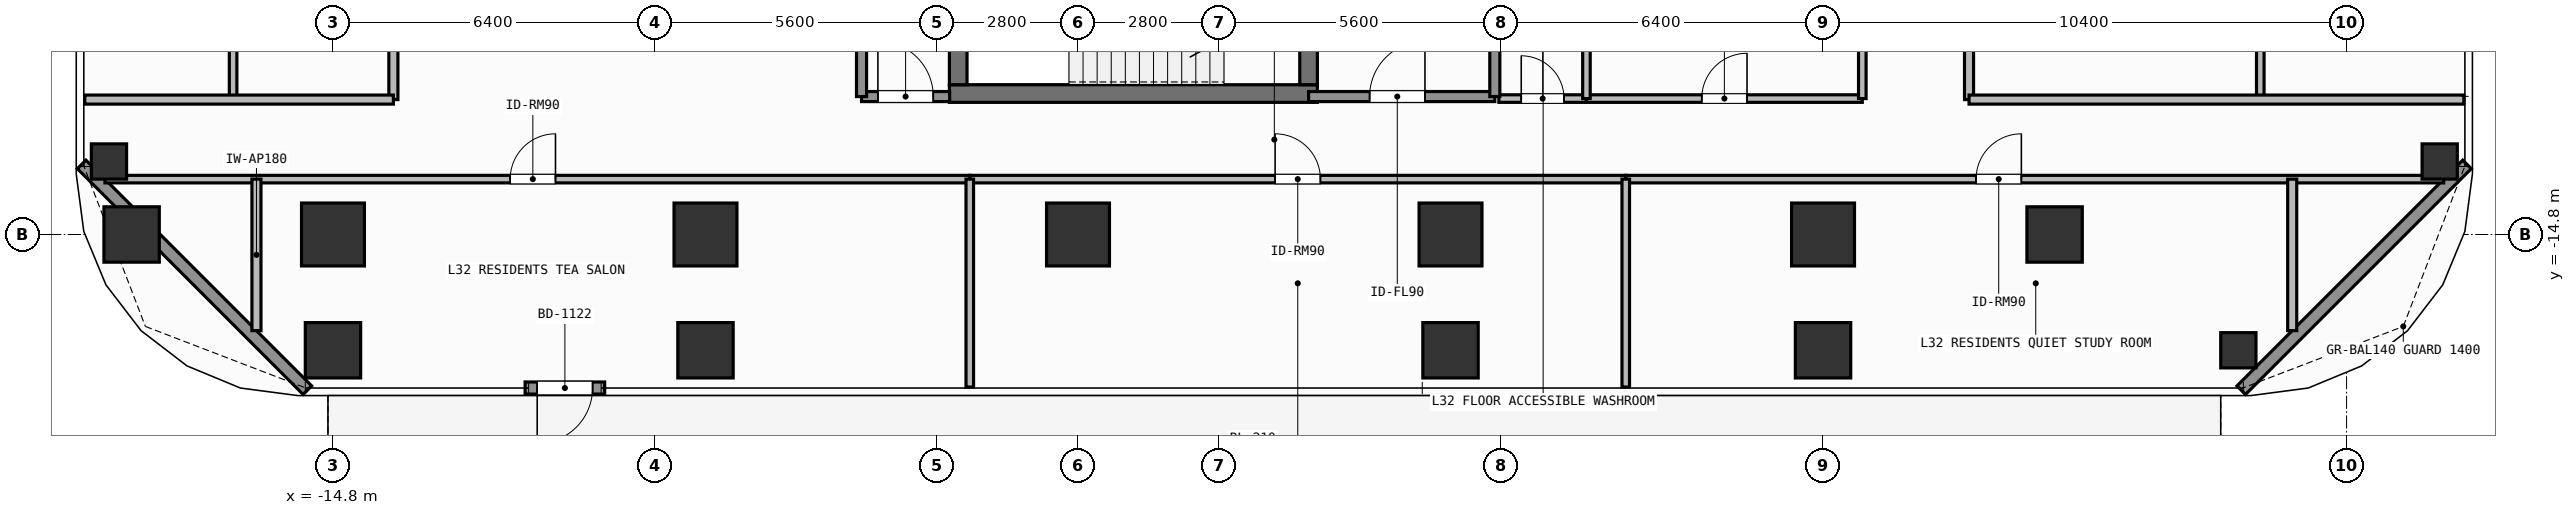
"""IFC4 building model, lengths in metres.
Left out: names, types, materials, properties, quantities, classifications, styles, units other than length and angle.
Written with IfcOpenShell. Run it as: python <this file> out.ifc"""

import sys

from ifc_helpers import new_model, si_unit, direction, frame, frame_2d, origin, origin_2d, place, context, subcontext, project, spatial, rectangle, hollow_rectangle, extrude, element, fill, save


model = new_model("IFC4")
c1 = context("Model", 3, precision=1e-05, world=origin(), true_north=direction((0.0, 1.0)))
c2 = subcontext(c1, "Body", "Model", "MODEL_VIEW")
j1 = project(units=[si_unit("LENGTHUNIT", "METRE"), si_unit("PLANEANGLEUNIT", "RADIAN")], contexts=[c1])
p1 = place(None, origin())
s1 = spatial("IfcSite", under=j1, at=p1, CompositionType="ELEMENT")
p2 = place(p1, origin())
s2 = spatial("IfcBuilding", under=s1, at=p2, CompositionType="ELEMENT")
p3 = place(p2, frame((0.0, 0.0, 129.0)))
s3 = spatial("IfcBuildingStorey", under=s2, at=p3, CompositionType="ELEMENT", Elevation=129.0)
p4 = place(p3, frame((-2.555, -12.0, 0.0), z_axis=(0.0, 0.0, 1.0), x_axis=(1.0, 0.0, 0.0)))
e1 = element("IfcWall", 1, at=p4, inside=s3, PredefinedType="SHEAR", context=c2, shape_type="SweptSolid", body=[
    extrude(rectangle(XDim=7.31, YDim=0.35, at=frame_2d((3.655, 0.0))), origin(), (0.0, 0.0, 1.0), 3.9),
])
p5 = place(p3, frame((-2.38, -11.825, 0.0), z_axis=(0.0, 0.0, 1.0), x_axis=(0.0, 1.0, 0.0)))
e2 = element("IfcWall", 2, at=p5, inside=s3, PredefinedType="SHEAR", context=c2, shape_type="SweptSolid", body=[
    extrude(rectangle(XDim=2.925, YDim=0.35, at=frame_2d((1.462, 0.0))), origin(), (0.0, 0.0, 1.0), 3.9),
])
p6 = place(p3, frame((4.58, -8.9, 0.0), z_axis=(0.0, 0.0, 1.0), x_axis=(0.0, -1.0, 0.0)))
e3 = element("IfcWall", 3, at=p6, inside=s3, PredefinedType="SHEAR", context=c2, shape_type="SweptSolid", body=[
    extrude(rectangle(XDim=2.925, YDim=0.35, at=frame_2d((1.462, 0.0))), origin(), (0.0, 0.0, 1.0), 3.9),
])
p7 = place(p6, frame((0.913, 0.0, 0.0)))
e4 = element("IfcOpeningElement", 4, at=p7, cuts=e3, PredefinedType="OPENING", context=c2, shape_type="SweptSolid", body=[
    extrude(rectangle(XDim=1.1, YDim=2.15, at=frame_2d((0.55, 1.075))), frame((0.0, 0.185, 0.0), z_axis=(0.0, -1.0, 0.0), x_axis=(1.0, 0.0, 0.0)), (0.0, 0.0, 1.0), 0.37),
])
for number, where, z_axis, x_axis in (
    (5, (-14.8, -14.8, 0.0), (0.0, 0.0, 1.0), (1.0, 0.0, 0.0)),
    (6, (-7.4, -14.8, 0.0), (0.0, 0.0, 1.0), (1.0, 0.0, 0.0)),
    (7, (0.0, -14.8, 0.0), (0.0, 0.0, 1.0), (1.0, 0.0, 0.0)),
    (8, (7.4, -14.8, 0.0), (0.0, 0.0, 1.0), (1.0, 0.0, 0.0)),
    (9, (14.8, -14.8, 0.0), (0.0, 0.0, 1.0), (1.0, 0.0, 0.0)),
):
    element("IfcColumn", number, at=place(p3, frame(where, z_axis=z_axis, x_axis=x_axis)), inside=s3, PredefinedType="COLUMN", context=c2, shape_type="SweptSolid", body=[
        extrude(rectangle(XDim=1.25, YDim=1.25, at=origin_2d()), origin(), (0.0, 0.0, 1.0), 3.9),
    ])
for number, where, z_axis, x_axis in (
    (10, (-18.8, -14.8, 0.0), (0.0, 0.0, 1.0), (1.0, 0.0, 0.0)),
    (11, (19.4, -14.8, 0.0), (0.0, 0.0, 1.0), (1.0, 0.0, 0.0)),
    (12, (-14.8, -17.1, 0.0), (0.0, 0.0, 1.0), (1.0, 0.0, 0.0)),
    (13, (-7.4, -17.1, 0.0), (0.0, 0.0, 1.0), (1.0, 0.0, 0.0)),
    (14, (7.4, -17.1, 0.0), (0.0, 0.0, 1.0), (1.0, 0.0, 0.0)),
    (15, (14.8, -17.1, 0.0), (0.0, 0.0, 1.0), (1.0, 0.0, 0.0)),
):
    element("IfcColumn", number, at=place(p3, frame(where, z_axis=z_axis, x_axis=x_axis)), inside=s3, PredefinedType="COLUMN", context=c2, shape_type="SweptSolid", body=[
        extrude(rectangle(XDim=1.1, YDim=1.1, at=origin_2d()), origin(), (0.0, 0.0, 1.0), 3.9),
    ])
for number, where, z_axis, x_axis in (
    (16, (23.05, -17.1, 0.0), (0.0, 0.0, 1.0), (1.0, 0.0, 0.0)),
    (17, (-19.25, -13.35, 0.0), (0.0, 0.0, 1.0), (1.0, 0.0, 0.0)),
    (18, (27.05, -13.35, 0.0), (0.0, 0.0, 1.0), (1.0, 0.0, 0.0)),
):
    element("IfcColumn", number, at=place(p3, frame(where, z_axis=z_axis, x_axis=x_axis)), inside=s3, PredefinedType="COLUMN", context=c2, shape_type="SweptSolid", body=[
        extrude(hollow_rectangle(XDim=0.7, YDim=0.7, WallThickness=0.032, at=origin_2d()), origin(), (0.0, 0.0, 1.0), 3.9),
    ])
p8 = place(p3, frame((-9.403, -17.85, 0.0), z_axis=(0.0, 0.0, 1.0), x_axis=(-1.0, 0.0, 0.0)))
e19 = element("IfcWall", 19, at=p8, inside=s3, PredefinedType="SOLIDWALL", context=c2, shape_type="SweptSolid", body=[
    extrude(rectangle(XDim=1.58, YDim=0.24, at=frame_2d((0.79, 0.0))), origin(), (0.0, 0.0, 1.0), 3.68),
])
p9 = place(p8, frame((0.24, 0.0, 0.0)))
e20 = element("IfcOpeningElement", 20, at=p9, cuts=e19, PredefinedType="OPENING", context=c2, shape_type="SweptSolid", body=[
    extrude(rectangle(XDim=1.1, YDim=2.2, at=frame_2d((0.55, 1.1))), frame((0.0, 0.13, 0.0), z_axis=(0.0, -1.0, 0.0), x_axis=(1.0, 0.0, 0.0)), (0.0, 0.0, 1.0), 0.26),
])
for number, where, z_axis, x_axis in (
    (21, (-15.308, -17.892, 0.0), (0.0, 0.0, 1.0), (-0.707, 0.707, 0.0)),
    (22, (27.592, -13.408, 0.0), (0.0, 0.0, 1.0), (-0.707, -0.707, 0.0)),
):
    element("IfcWall", number, at=place(p3, frame(where, z_axis=z_axis, x_axis=x_axis)), inside=s3, PredefinedType="SOLIDWALL", context=c2, shape_type="SweptSolid", body=[
        extrude(rectangle(XDim=6.342, YDim=0.24, at=frame_2d((3.171, 0.0))), origin(), (0.0, 0.0, 1.0), 3.68),
    ])
p10 = place(p3, frame((4.58, -12.06, 0.0), z_axis=(0.0, 0.0, 1.0), x_axis=(1.0, 0.0, 0.0)))
e23 = element("IfcWall", 23, at=p10, inside=s3, PredefinedType="SOLIDWALL", context=c2, shape_type="SweptSolid", body=[
    extrude(rectangle(XDim=3.7, YDim=0.2, at=frame_2d((1.85, 0.0))), origin(), (0.0, 0.0, 1.0), 3.68),
])
p11 = place(p10, frame((1.212, 0.0, 0.0)))
e24 = element("IfcOpeningElement", 24, at=p11, cuts=e23, PredefinedType="OPENING", context=c2, shape_type="SweptSolid", body=[
    extrude(rectangle(XDim=1.1, YDim=2.15, at=frame_2d((0.55, 1.075))), frame((0.0, 0.11, 0.0), z_axis=(0.0, -1.0, 0.0), x_axis=(1.0, 0.0, 0.0)), (0.0, 0.0, 1.0), 0.22),
])
p12 = place(p3, frame((-4.3, -12.06, 0.0), z_axis=(0.0, 0.0, 1.0), x_axis=(1.0, 0.0, 0.0)))
e25 = element("IfcWall", 25, at=p12, inside=s3, PredefinedType="SOLIDWALL", context=c2, shape_type="SweptSolid", body=[
    extrude(rectangle(XDim=1.75, YDim=0.2, at=frame_2d((0.875, 0.0))), origin(), (0.0, 0.0, 1.0), 3.68),
])
p13 = place(p12, frame((0.325, 0.0, 0.0)))
e26 = element("IfcOpeningElement", 26, at=p13, cuts=e25, PredefinedType="OPENING", context=c2, shape_type="SweptSolid", body=[
    extrude(rectangle(XDim=1.1, YDim=2.15, at=frame_2d((0.55, 1.075))), frame((0.0, 0.11, 0.0), z_axis=(0.0, -1.0, 0.0), x_axis=(1.0, 0.0, 0.0)), (0.0, 0.0, 1.0), 0.22),
])
p14 = place(p3, frame((8.36, -12.1, 0.0), z_axis=(0.0, 0.0, 1.0), x_axis=(1.0, 0.0, 0.0)))
e27 = element("IfcWall", 27, at=p14, inside=s3, PredefinedType="PARTITIONING", context=c2, shape_type="SweptSolid", body=[
    extrude(rectangle(XDim=1.74, YDim=0.15, at=frame_2d((0.87, 0.0))), origin(), (0.0, 0.0, 1.0), 3.68),
])
p15 = place(p14, frame((0.445, 0.0, 0.0)))
e28 = element("IfcOpeningElement", 28, at=p15, cuts=e27, PredefinedType="OPENING", context=c2, shape_type="SweptSolid", body=[
    extrude(rectangle(XDim=0.85, YDim=2.1, at=frame_2d((0.425, 1.05))), frame((0.0, 0.085, 0.0), z_axis=(0.0, -1.0, 0.0), x_axis=(1.0, 0.0, 0.0)), (0.0, 0.0, 1.0), 0.17),
])
p16 = place(p3, frame((10.1, -12.1, 0.0), z_axis=(0.0, 0.0, 1.0), x_axis=(1.0, 0.0, 0.0)))
e29 = element("IfcWall", 29, at=p16, inside=s3, PredefinedType="PARTITIONING", context=c2, shape_type="SweptSolid", body=[
    extrude(rectangle(XDim=5.48, YDim=0.15, at=frame_2d((2.74, 0.0))), origin(), (0.0, 0.0, 1.0), 3.68),
])
p17 = place(p16, frame((2.29, 0.0, 0.0)))
e30 = element("IfcOpeningElement", 30, at=p17, cuts=e29, PredefinedType="OPENING", context=c2, shape_type="SweptSolid", body=[
    extrude(rectangle(XDim=0.9, YDim=2.1, at=frame_2d((0.45, 1.05))), frame((0.0, 0.085, 0.0), z_axis=(0.0, -1.0, 0.0), x_axis=(1.0, 0.0, 0.0)), (0.0, 0.0, 1.0), 0.17),
])
p18 = place(p3, frame((-19.33, -13.7, 0.0), z_axis=(0.0, 0.0, 1.0), x_axis=(1.0, 0.0, 0.0)))
e31 = element("IfcWall", 31, at=p18, inside=s3, PredefinedType="PARTITIONING", context=c2, shape_type="SweptSolid", body=[
    extrude(rectangle(XDim=17.18, YDim=0.15, at=frame_2d((8.59, 0.0))), origin(), (0.0, 0.0, 1.0), 3.68),
])
p19 = place(p18, frame((8.05, 0.0, 0.0)))
e32 = element("IfcOpeningElement", 32, at=p19, cuts=e31, PredefinedType="OPENING", context=c2, shape_type="SweptSolid", body=[
    extrude(rectangle(XDim=0.9, YDim=2.1, at=frame_2d((0.45, 1.05))), frame((0.0, 0.085, 0.0), z_axis=(0.0, -1.0, 0.0), x_axis=(1.0, 0.0, 0.0)), (0.0, 0.0, 1.0), 0.17),
])
p20 = place(p3, frame((-2.15, -13.7, 0.0), z_axis=(0.0, 0.0, 1.0), x_axis=(1.0, 0.0, 0.0)))
e33 = element("IfcWall", 33, at=p20, inside=s3, PredefinedType="PARTITIONING", context=c2, shape_type="SweptSolid", body=[
    extrude(rectangle(XDim=13.031, YDim=0.15, at=frame_2d((6.516, 0.0))), origin(), (0.0, 0.0, 1.0), 3.68),
])
p21 = place(p20, frame((6.065, 0.0, 0.0)))
e34 = element("IfcOpeningElement", 34, at=p21, cuts=e33, PredefinedType="OPENING", context=c2, shape_type="SweptSolid", body=[
    extrude(rectangle(XDim=0.9, YDim=2.1, at=frame_2d((0.45, 1.05))), frame((0.0, 0.085, 0.0), z_axis=(0.0, -1.0, 0.0), x_axis=(1.0, 0.0, 0.0)), (0.0, 0.0, 1.0), 0.17),
])
p22 = place(p3, frame((10.881, -13.7, 0.0), z_axis=(0.0, 0.0, 1.0), x_axis=(1.0, 0.0, 0.0)))
e35 = element("IfcWall", 35, at=p22, inside=s3, PredefinedType="PARTITIONING", context=c2, shape_type="SweptSolid", body=[
    extrude(rectangle(XDim=16.249, YDim=0.15, at=frame_2d((8.125, 0.0))), origin(), (0.0, 0.0, 1.0), 3.68),
])
p23 = place(p22, frame((6.959, 0.0, 0.0)))
e36 = element("IfcOpeningElement", 36, at=p23, cuts=e35, PredefinedType="OPENING", context=c2, shape_type="SweptSolid", body=[
    extrude(rectangle(XDim=0.9, YDim=2.1, at=frame_2d((0.45, 1.05))), frame((0.0, 0.085, 0.0), z_axis=(0.0, -1.0, 0.0), x_axis=(1.0, 0.0, 0.0)), (0.0, 0.0, 1.0), 0.17),
])
p24 = place(p3, frame((-13.6, -12.12, 0.0), z_axis=(0.0, 0.0, 1.0), x_axis=(0.0, 1.0, 0.0)))
e37 = element("IfcWall", 37, at=p24, inside=s3, PredefinedType="PARTITIONING", context=c2, shape_type="SweptSolid", body=[
    extrude(rectangle(XDim=24.24, YDim=0.18, at=frame_2d((12.12, 0.0))), origin(), (0.0, 0.0, 1.0), 3.68),
])
p25 = place(p24, frame((11.62, 0.0, 0.0)))
e38 = element("IfcOpeningElement", 38, at=p25, cuts=e37, PredefinedType="OPENING", context=c2, shape_type="SweptSolid", body=[
    extrude(rectangle(XDim=1.0, YDim=2.2, at=frame_2d((0.5, 1.1))), frame((0.0, 0.1, 0.0), z_axis=(0.0, -1.0, 0.0), x_axis=(1.0, 0.0, 0.0)), (0.0, 0.0, 1.0), 0.2),
])
p26 = place(p3, frame((17.7, -12.12, 0.0), z_axis=(0.0, 0.0, 1.0), x_axis=(0.0, 1.0, 0.0)))
e39 = element("IfcWall", 39, at=p26, inside=s3, PredefinedType="PARTITIONING", context=c2, shape_type="SweptSolid", body=[
    extrude(rectangle(XDim=13.429, YDim=0.18, at=frame_2d((6.715, 0.0))), origin(), (0.0, 0.0, 1.0), 3.68),
])
p27 = place(p26, frame((5.324, 0.0, 0.0)))
e40 = element("IfcOpeningElement", 40, at=p27, cuts=e39, PredefinedType="OPENING", context=c2, shape_type="SweptSolid", body=[
    extrude(rectangle(XDim=1.0, YDim=2.2, at=frame_2d((0.5, 1.1))), frame((0.0, 0.1, 0.0), z_axis=(0.0, -1.0, 0.0), x_axis=(1.0, 0.0, 0.0)), (0.0, 0.0, 1.0), 0.2),
])
for number, where, z_axis, x_axis in (
    (41, (8.28, -12.06, 0.0), (0.0, 0.0, 1.0), (0.0, 1.0, 0.0)),
    (42, (-4.3, -12.06, 0.0), (0.0, 0.0, 1.0), (0.0, 1.0, 0.0)),
):
    element("IfcWall", number, at=place(p3, frame(where, z_axis=z_axis, x_axis=x_axis)), inside=s3, PredefinedType="SOLIDWALL", context=c2, shape_type="SweptSolid", body=[
        extrude(rectangle(XDim=3.185, YDim=0.2, at=frame_2d((1.593, 0.0))), origin(), (0.0, 0.0, 1.0), 3.68),
    ])
p28 = place(p3, frame((10.1, -12.1, 0.0), z_axis=(0.0, 0.0, 1.0), x_axis=(0.0, 1.0, 0.0)))
e43 = element("IfcWall", 43, at=p28, inside=s3, PredefinedType="PARTITIONING", context=c2, shape_type="SweptSolid", body=[
    extrude(rectangle(XDim=2.35, YDim=0.15, at=frame_2d((1.175, 0.0))), origin(), (0.0, 0.0, 1.0), 3.68),
])
p29 = place(p3, frame((15.58, -12.1, 0.0), z_axis=(0.0, 0.0, 1.0), x_axis=(0.0, 1.0, 0.0)))
e44 = element("IfcWall", 44, at=p29, inside=s3, PredefinedType="PARTITIONING", context=c2, shape_type="SweptSolid", body=[
    extrude(rectangle(XDim=6.25, YDim=0.15, at=frame_2d((3.125, 0.0))), origin(), (0.0, 0.0, 1.0), 3.68),
])
for number, where, z_axis, x_axis in (
    (45, (-16.32, -16.71, 0.0), (0.0, 0.0, 1.0), (0.0, 1.0, 0.0)),
    (46, (24.12, -16.71, 0.0), (0.0, 0.0, 1.0), (0.0, 1.0, 0.0)),
):
    element("IfcWall", number, at=place(p3, frame(where, z_axis=z_axis, x_axis=x_axis)), inside=s3, PredefinedType="PARTITIONING", context=c2, shape_type="SweptSolid", body=[
        extrude(rectangle(XDim=3.01, YDim=0.18, at=frame_2d((1.505, 0.0))), origin(), (0.0, 0.0, 1.0), 3.68),
    ])
for number, where, z_axis, x_axis in (
    (47, (-2.15, -17.83, 0.0), (0.0, 0.0, 1.0), (0.0, 1.0, 0.0)),
    (48, (10.881, -17.83, 0.0), (0.0, 0.0, 1.0), (0.0, 1.0, 0.0)),
):
    element("IfcWall", number, at=place(p3, frame(where, z_axis=z_axis, x_axis=x_axis)), inside=s3, PredefinedType="PARTITIONING", context=c2, shape_type="SweptSolid", body=[
        extrude(rectangle(XDim=4.13, YDim=0.15, at=frame_2d((2.065, 0.0))), origin(), (0.0, 0.0, 1.0), 3.68),
    ])
p30 = place(p3, frame((-16.784, -12.12, 0.0), z_axis=(0.0, 0.0, 1.0), x_axis=(0.0, 1.0, 0.0)))
e49 = element("IfcWall", 49, at=p30, inside=s3, PredefinedType="PARTITIONING", context=c2, shape_type="SweptSolid", body=[
    extrude(rectangle(XDim=6.671, YDim=0.15, at=frame_2d((3.335, 0.0))), origin(), (0.0, 0.0, 1.0), 3.68),
])
p31 = place(p3, frame((-19.73, -12.12, 0.0), z_axis=(0.0, 0.0, 1.0), x_axis=(1.0, 0.0, 0.0)))
e50 = element("IfcWall", 50, at=p31, inside=s3, PredefinedType="PARTITIONING", context=c2, shape_type="SweptSolid", body=[
    extrude(rectangle(XDim=6.13, YDim=0.18, at=frame_2d((3.065, 0.0))), origin(), (0.0, 0.0, 1.0), 3.68),
])
p32 = place(p3, frame((23.486, -12.12, 0.0), z_axis=(0.0, 0.0, 1.0), x_axis=(0.0, 1.0, 0.0)))
e51 = element("IfcWall", 51, at=p32, inside=s3, PredefinedType="PARTITIONING", context=c2, shape_type="SweptSolid", body=[
    extrude(rectangle(XDim=2.8, YDim=0.15, at=frame_2d((1.4, 0.0))), origin(), (0.0, 0.0, 1.0), 3.68),
])
p33 = place(p3, frame((17.7, -12.12, 0.0), z_axis=(0.0, 0.0, 1.0), x_axis=(1.0, 0.0, 0.0)))
e52 = element("IfcWall", 52, at=p33, inside=s3, PredefinedType="PARTITIONING", context=c2, shape_type="SweptSolid", body=[
    extrude(rectangle(XDim=9.83, YDim=0.18, at=frame_2d((4.915, 0.0))), origin(), (0.0, 0.0, 1.0), 3.68),
])
p34 = place(p9, origin())
e53 = element("IfcDoor", 53, at=p34, inside=s3, OperationType="SINGLE_SWING_RIGHT", PredefinedType="DOOR", context=c2, shape_type="SweptSolid", body=[
    extrude(rectangle(XDim=1.1, YDim=2.2, at=frame_2d((0.55, 1.1))), frame((0.0, 0.025, 0.0), z_axis=(0.0, -1.0, 0.0), x_axis=(1.0, 0.0, 0.0)), (0.0, 0.0, 1.0), 0.05),
])
fill(e20, e53)
p35 = place(p11, origin())
e54 = element("IfcDoor", 54, at=p35, inside=s3, OperationType="SINGLE_SWING_RIGHT", PredefinedType="DOOR", context=c2, shape_type="SweptSolid", body=[
    extrude(rectangle(XDim=1.1, YDim=2.15, at=frame_2d((0.55, 1.075))), frame((0.0, 0.025, 0.0), z_axis=(0.0, -1.0, 0.0), x_axis=(1.0, 0.0, 0.0)), (0.0, 0.0, 1.0), 0.05),
])
fill(e24, e54)
p36 = place(p13, origin())
e55 = element("IfcDoor", 55, at=p36, inside=s3, OperationType="SINGLE_SWING_LEFT", PredefinedType="DOOR", context=c2, shape_type="SweptSolid", body=[
    extrude(rectangle(XDim=1.1, YDim=2.15, at=frame_2d((0.55, 1.075))), frame((0.0, 0.025, 0.0), z_axis=(0.0, -1.0, 0.0), x_axis=(1.0, 0.0, 0.0)), (0.0, 0.0, 1.0), 0.05),
])
fill(e26, e55)
p37 = place(p15, origin())
e56 = element("IfcDoor", 56, at=p37, inside=s3, OperationType="SINGLE_SWING_LEFT", PredefinedType="DOOR", context=c2, shape_type="SweptSolid", body=[
    extrude(rectangle(XDim=0.85, YDim=2.1, at=frame_2d((0.425, 1.05))), frame((0.0, 0.025, 0.0), z_axis=(0.0, -1.0, 0.0), x_axis=(1.0, 0.0, 0.0)), (0.0, 0.0, 1.0), 0.05),
])
fill(e28, e56)
p38 = place(p17, origin())
e57 = element("IfcDoor", 57, at=p38, inside=s3, OperationType="SINGLE_SWING_RIGHT", PredefinedType="DOOR", context=c2, shape_type="SweptSolid", body=[
    extrude(rectangle(XDim=0.9, YDim=2.1, at=frame_2d((0.45, 1.05))), frame((0.0, 0.025, 0.0), z_axis=(0.0, -1.0, 0.0), x_axis=(1.0, 0.0, 0.0)), (0.0, 0.0, 1.0), 0.05),
])
fill(e30, e57)
p39 = place(p19, origin())
e58 = element("IfcDoor", 58, at=p39, inside=s3, OperationType="SINGLE_SWING_RIGHT", PredefinedType="DOOR", context=c2, shape_type="SweptSolid", body=[
    extrude(rectangle(XDim=0.9, YDim=2.1, at=frame_2d((0.45, 1.05))), frame((0.0, 0.025, 0.0), z_axis=(0.0, -1.0, 0.0), x_axis=(1.0, 0.0, 0.0)), (0.0, 0.0, 1.0), 0.05),
])
fill(e32, e58)
p40 = place(p21, origin())
e59 = element("IfcDoor", 59, at=p40, inside=s3, OperationType="SINGLE_SWING_LEFT", PredefinedType="DOOR", context=c2, shape_type="SweptSolid", body=[
    extrude(rectangle(XDim=0.9, YDim=2.1, at=frame_2d((0.45, 1.05))), frame((0.0, 0.025, 0.0), z_axis=(0.0, -1.0, 0.0), x_axis=(1.0, 0.0, 0.0)), (0.0, 0.0, 1.0), 0.05),
])
fill(e34, e59)
p41 = place(p23, origin())
e60 = element("IfcDoor", 60, at=p41, inside=s3, OperationType="SINGLE_SWING_RIGHT", PredefinedType="DOOR", context=c2, shape_type="SweptSolid", body=[
    extrude(rectangle(XDim=0.9, YDim=2.1, at=frame_2d((0.45, 1.05))), frame((0.0, 0.025, 0.0), z_axis=(0.0, -1.0, 0.0), x_axis=(1.0, 0.0, 0.0)), (0.0, 0.0, 1.0), 0.05),
])
fill(e36, e60)
save(model, sys.argv[1])
